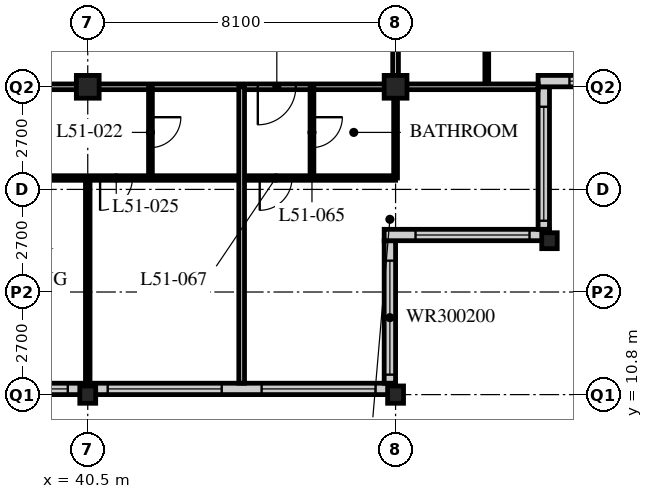
"""IFC4 building model, lengths in metres.
Left out: names, types, materials, properties, quantities, classifications, styles, units other than length and angle.
Written with IfcOpenShell. Run it as: python <this file> out.ifc"""

import sys

from ifc_helpers import new_model, si_unit, direction, frame, frame_2d, origin, origin_2d, place, context, subcontext, project, spatial, rectangle, hollow_rectangle, i_section, extrude, element, fill, save


model = new_model("IFC4")
c1 = context("Model", 3, precision=1e-05, world=origin(), true_north=direction((0.0, 1.0)))
c2 = subcontext(c1, "Body", "Model", "MODEL_VIEW")
j1 = project(units=[si_unit("LENGTHUNIT", "METRE"), si_unit("PLANEANGLEUNIT", "RADIAN")], contexts=[c1])
p1 = place(None, origin())
s1 = spatial("IfcSite", under=j1, at=p1, CompositionType="ELEMENT")
p2 = place(p1, origin())
s2 = spatial("IfcBuilding", under=s1, at=p2, CompositionType="ELEMENT")
p3 = place(p2, frame((0.0, 0.0, 199.2)))
s3 = spatial("IfcBuildingStorey", under=s2, at=p3, CompositionType="ELEMENT", Elevation=199.2)
p4 = place(p3, frame((40.5, 10.8, 0.0), z_axis=(0.0, 0.0, 1.0), x_axis=(1.0, 0.0, 0.0)))
e1 = element("IfcColumn", 1, at=p4, inside=s3, PredefinedType="COLUMN", context=c2, shape_type="SweptSolid", body=[
    extrude(i_section(OverallWidth=0.418, OverallDepth=0.456, WebThickness=0.042, FlangeThickness=0.067, FilletRadius=0.015, at=origin_2d()), origin(), (0.0, 0.0, 1.0), 3.6),
])
p5 = place(p3, frame((40.5, 18.9, 0.0), z_axis=(0.0, 0.0, 1.0), x_axis=(1.0, 0.0, 0.0)))
e2 = element("IfcColumn", 2, at=p5, inside=s3, PredefinedType="COLUMN", context=c2, shape_type="SweptSolid", body=[
    extrude(hollow_rectangle(XDim=0.6, YDim=0.6, WallThickness=0.05, at=origin_2d()), origin(), (0.0, 0.0, 1.0), 3.6),
])
p6 = place(p3, frame((48.6, 10.8, 0.0), z_axis=(0.0, 0.0, 1.0), x_axis=(1.0, 0.0, 0.0)))
e3 = element("IfcColumn", 3, at=p6, inside=s3, PredefinedType="COLUMN", context=c2, shape_type="SweptSolid", body=[
    extrude(i_section(OverallWidth=0.418, OverallDepth=0.456, WebThickness=0.042, FlangeThickness=0.067, FilletRadius=0.015, at=origin_2d()), origin(), (0.0, 0.0, 1.0), 3.6),
])
p7 = place(p3, frame((48.6, 18.9, 0.0), z_axis=(0.0, 0.0, 1.0), x_axis=(1.0, 0.0, 0.0)))
e4 = element("IfcColumn", 4, at=p7, inside=s3, PredefinedType="COLUMN", context=c2, shape_type="SweptSolid", body=[
    extrude(hollow_rectangle(XDim=0.6, YDim=0.6, WallThickness=0.05, at=origin_2d()), origin(), (0.0, 0.0, 1.0), 3.6),
])
p8 = place(p3, frame((52.65, 14.85, 0.0), z_axis=(0.0, 0.0, 1.0), x_axis=(1.0, 0.0, 0.0)))
e5 = element("IfcColumn", 5, at=p8, inside=s3, PredefinedType="COLUMN", context=c2, shape_type="SweptSolid", body=[
    extrude(i_section(OverallWidth=0.407, OverallDepth=0.419, WebThickness=0.031, FlangeThickness=0.049, FilletRadius=0.015, at=origin_2d()), origin(), (0.0, 0.0, 1.0), 3.6),
])
p9 = place(p3, frame((8.4, 10.95, 0.0), z_axis=(0.0, 0.0, 1.0), x_axis=(1.0, 0.0, 0.0)))
e6 = element("IfcWall", 6, at=p9, inside=s3, PredefinedType="SOLIDWALL", context=c2, shape_type="SweptSolid", body=[
    extrude(rectangle(XDim=40.2, YDim=0.3, at=frame_2d((20.1, 0.0))), origin(), (0.0, 0.0, 1.0), 3.39),
])
p10 = place(p9, frame((0.225, 0.0, 0.6)))
e7 = element("IfcOpeningElement", 7, at=p10, cuts=e6, PredefinedType="OPENING", context=c2, shape_type="SweptSolid", body=[
    extrude(rectangle(XDim=3.0, YDim=2.4, at=frame_2d((1.5, 1.2))), frame((0.0, 0.16, 0.0), z_axis=(0.0, -1.0, 0.0), x_axis=(1.0, 0.0, 0.0)), (0.0, 0.0, 1.0), 0.32),
])
p11 = place(p9, frame((4.275, 0.0, 0.6)))
e8 = element("IfcOpeningElement", 8, at=p11, cuts=e6, PredefinedType="OPENING", context=c2, shape_type="SweptSolid", body=[
    extrude(rectangle(XDim=3.0, YDim=2.4, at=frame_2d((1.5, 1.2))), frame((0.0, 0.16, 0.0), z_axis=(0.0, -1.0, 0.0), x_axis=(1.0, 0.0, 0.0)), (0.0, 0.0, 1.0), 0.32),
])
p12 = place(p9, frame((8.325, 0.0, 0.6)))
e9 = element("IfcOpeningElement", 9, at=p12, cuts=e6, PredefinedType="OPENING", context=c2, shape_type="SweptSolid", body=[
    extrude(rectangle(XDim=3.0, YDim=2.4, at=frame_2d((1.5, 1.2))), frame((0.0, 0.16, 0.0), z_axis=(0.0, -1.0, 0.0), x_axis=(1.0, 0.0, 0.0)), (0.0, 0.0, 1.0), 0.32),
])
p13 = place(p9, frame((12.375, 0.0, 0.6)))
e10 = element("IfcOpeningElement", 10, at=p13, cuts=e6, PredefinedType="OPENING", context=c2, shape_type="SweptSolid", body=[
    extrude(rectangle(XDim=3.0, YDim=2.4, at=frame_2d((1.5, 1.2))), frame((0.0, 0.16, 0.0), z_axis=(0.0, -1.0, 0.0), x_axis=(1.0, 0.0, 0.0)), (0.0, 0.0, 1.0), 0.32),
])
p14 = place(p9, frame((16.425, 0.0, 0.6)))
e11 = element("IfcOpeningElement", 11, at=p14, cuts=e6, PredefinedType="OPENING", context=c2, shape_type="SweptSolid", body=[
    extrude(rectangle(XDim=3.0, YDim=2.4, at=frame_2d((1.5, 1.2))), frame((0.0, 0.16, 0.0), z_axis=(0.0, -1.0, 0.0), x_axis=(1.0, 0.0, 0.0)), (0.0, 0.0, 1.0), 0.32),
])
p15 = place(p9, frame((20.475, 0.0, 0.6)))
e12 = element("IfcOpeningElement", 12, at=p15, cuts=e6, PredefinedType="OPENING", context=c2, shape_type="SweptSolid", body=[
    extrude(rectangle(XDim=3.0, YDim=2.4, at=frame_2d((1.5, 1.2))), frame((0.0, 0.16, 0.0), z_axis=(0.0, -1.0, 0.0), x_axis=(1.0, 0.0, 0.0)), (0.0, 0.0, 1.0), 0.32),
])
p16 = place(p9, frame((24.525, 0.0, 0.6)))
e13 = element("IfcOpeningElement", 13, at=p16, cuts=e6, PredefinedType="OPENING", context=c2, shape_type="SweptSolid", body=[
    extrude(rectangle(XDim=3.0, YDim=2.4, at=frame_2d((1.5, 1.2))), frame((0.0, 0.16, 0.0), z_axis=(0.0, -1.0, 0.0), x_axis=(1.0, 0.0, 0.0)), (0.0, 0.0, 1.0), 0.32),
])
p17 = place(p9, frame((28.575, 0.0, 0.6)))
e14 = element("IfcOpeningElement", 14, at=p17, cuts=e6, PredefinedType="OPENING", context=c2, shape_type="SweptSolid", body=[
    extrude(rectangle(XDim=3.0, YDim=2.4, at=frame_2d((1.5, 1.2))), frame((0.0, 0.16, 0.0), z_axis=(0.0, -1.0, 0.0), x_axis=(1.0, 0.0, 0.0)), (0.0, 0.0, 1.0), 0.32),
])
p18 = place(p9, frame((32.625, 0.0, 0.6)))
e15 = element("IfcOpeningElement", 15, at=p18, cuts=e6, PredefinedType="OPENING", context=c2, shape_type="SweptSolid", body=[
    extrude(rectangle(XDim=3.0, YDim=2.4, at=frame_2d((1.5, 1.2))), frame((0.0, 0.16, 0.0), z_axis=(0.0, -1.0, 0.0), x_axis=(1.0, 0.0, 0.0)), (0.0, 0.0, 1.0), 0.32),
])
p19 = place(p9, frame((36.675, 0.0, 0.6)))
e16 = element("IfcOpeningElement", 16, at=p19, cuts=e6, PredefinedType="OPENING", context=c2, shape_type="SweptSolid", body=[
    extrude(rectangle(XDim=3.0, YDim=2.4, at=frame_2d((1.5, 1.2))), frame((0.0, 0.16, 0.0), z_axis=(0.0, -1.0, 0.0), x_axis=(1.0, 0.0, 0.0)), (0.0, 0.0, 1.0), 0.32),
])
p20 = place(p3, frame((48.45, 11.1, 0.0), z_axis=(0.0, 0.0, 1.0), x_axis=(0.0, 1.0, 0.0)))
e17 = element("IfcWall", 17, at=p20, inside=s3, PredefinedType="SOLIDWALL", context=c2, shape_type="SweptSolid", body=[
    extrude(rectangle(XDim=3.75, YDim=0.3, at=frame_2d((1.875, 0.0))), origin(), (0.0, 0.0, 1.0), 3.39),
])
p21 = place(p20, frame((0.225, 0.0, 0.6)))
e18 = element("IfcOpeningElement", 18, at=p21, cuts=e17, PredefinedType="OPENING", context=c2, shape_type="SweptSolid", body=[
    extrude(rectangle(XDim=3.0, YDim=2.0, at=frame_2d((1.5, 1.0))), frame((0.0, 0.16, 0.0), z_axis=(0.0, -1.0, 0.0), x_axis=(1.0, 0.0, 0.0)), (0.0, 0.0, 1.0), 0.32),
])
p22 = place(p3, frame((48.3, 15.0, 0.0), z_axis=(0.0, 0.0, 1.0), x_axis=(1.0, 0.0, 0.0)))
e19 = element("IfcWall", 19, at=p22, inside=s3, PredefinedType="SOLIDWALL", context=c2, shape_type="SweptSolid", body=[
    extrude(rectangle(XDim=4.35, YDim=0.3, at=frame_2d((2.175, 0.0))), origin(), (0.0, 0.0, 1.0), 3.39),
])
p23 = place(p22, frame((0.825, 0.0, 0.6)))
e20 = element("IfcOpeningElement", 20, at=p23, cuts=e19, PredefinedType="OPENING", context=c2, shape_type="SweptSolid", body=[
    extrude(rectangle(XDim=3.0, YDim=2.0, at=frame_2d((1.5, 1.0))), frame((0.0, 0.16, 0.0), z_axis=(0.0, -1.0, 0.0), x_axis=(1.0, 0.0, 0.0)), (0.0, 0.0, 1.0), 0.32),
])
p24 = place(p3, frame((52.5, 15.15, 0.0), z_axis=(0.0, 0.0, 1.0), x_axis=(0.0, 1.0, 0.0)))
e21 = element("IfcWall", 21, at=p24, inside=s3, PredefinedType="SOLIDWALL", context=c2, shape_type="SweptSolid", body=[
    extrude(rectangle(XDim=3.75, YDim=0.3, at=frame_2d((1.875, 0.0))), origin(), (0.0, 0.0, 1.0), 3.39),
])
p25 = place(p24, frame((0.225, 0.0, 0.6)))
e22 = element("IfcOpeningElement", 22, at=p25, cuts=e21, PredefinedType="OPENING", context=c2, shape_type="SweptSolid", body=[
    extrude(rectangle(XDim=3.0, YDim=2.0, at=frame_2d((1.5, 1.0))), frame((0.0, 0.16, 0.0), z_axis=(0.0, -1.0, 0.0), x_axis=(1.0, 0.0, 0.0)), (0.0, 0.0, 1.0), 0.32),
])
p26 = place(p3, frame((52.35, 19.05, 0.0), z_axis=(0.0, 0.0, 1.0), x_axis=(1.0, 0.0, 0.0)))
e23 = element("IfcWall", 23, at=p26, inside=s3, PredefinedType="SOLIDWALL", context=c2, shape_type="SweptSolid", body=[
    extrude(rectangle(XDim=4.35, YDim=0.3, at=frame_2d((2.175, 0.0))), origin(), (0.0, 0.0, 1.0), 3.39),
])
p27 = place(p26, frame((0.825, 0.0, 0.6)))
e24 = element("IfcOpeningElement", 24, at=p27, cuts=e23, PredefinedType="OPENING", context=c2, shape_type="SweptSolid", body=[
    extrude(rectangle(XDim=3.0, YDim=2.0, at=frame_2d((1.5, 1.0))), frame((0.0, 0.16, 0.0), z_axis=(0.0, -1.0, 0.0), x_axis=(1.0, 0.0, 0.0)), (0.0, 0.0, 1.0), 0.32),
])
p28 = place(p3, frame((8.1, 18.9, 0.0), z_axis=(0.0, 0.0, 1.0), x_axis=(1.0, 0.0, 0.0)))
e25 = element("IfcWall", 25, at=p28, inside=s3, PredefinedType="PARTITIONING", context=c2, shape_type="SweptSolid", body=[
    extrude(rectangle(XDim=40.5, YDim=0.15, at=frame_2d((20.25, 0.0))), origin(), (0.0, 0.0, 1.0), 2.778),
])
p29 = place(p28, frame((4.45, 0.0, 0.0)))
e26 = element("IfcOpeningElement", 26, at=p29, cuts=e25, PredefinedType="OPENING", context=c2, shape_type="SweptSolid", body=[
    extrude(rectangle(XDim=1.0, YDim=2.1, at=frame_2d((0.5, 1.05))), frame((0.0, 0.085, 0.0), z_axis=(0.0, -1.0, 0.0), x_axis=(1.0, 0.0, 0.0)), (0.0, 0.0, 1.0), 0.17),
])
p30 = place(p28, frame((17.1, 0.0, 0.0)))
e27 = element("IfcOpeningElement", 27, at=p30, cuts=e25, PredefinedType="OPENING", context=c2, shape_type="SweptSolid", body=[
    extrude(rectangle(XDim=1.0, YDim=2.1, at=frame_2d((0.5, 1.05))), frame((0.0, 0.085, 0.0), z_axis=(0.0, -1.0, 0.0), x_axis=(1.0, 0.0, 0.0)), (0.0, 0.0, 1.0), 0.17),
])
p31 = place(p28, frame((28.75, 0.0, 0.0)))
e28 = element("IfcOpeningElement", 28, at=p31, cuts=e25, PredefinedType="OPENING", context=c2, shape_type="SweptSolid", body=[
    extrude(rectangle(XDim=1.0, YDim=2.1, at=frame_2d((0.5, 1.05))), frame((0.0, 0.085, 0.0), z_axis=(0.0, -1.0, 0.0), x_axis=(1.0, 0.0, 0.0)), (0.0, 0.0, 1.0), 0.17),
])
p32 = place(p28, frame((2.625, 0.0, 0.0)))
e29 = element("IfcOpeningElement", 29, at=p32, cuts=e25, PredefinedType="OPENING", context=c2, shape_type="SweptSolid", body=[
    extrude(rectangle(XDim=1.0, YDim=2.1, at=frame_2d((0.5, 1.05))), frame((0.0, 0.085, 0.0), z_axis=(0.0, -1.0, 0.0), x_axis=(1.0, 0.0, 0.0)), (0.0, 0.0, 1.0), 0.17),
])
p33 = place(p28, frame((36.875, 0.0, 0.0)))
e30 = element("IfcOpeningElement", 30, at=p33, cuts=e25, PredefinedType="OPENING", context=c2, shape_type="SweptSolid", body=[
    extrude(rectangle(XDim=1.0, YDim=2.1, at=frame_2d((0.5, 1.05))), frame((0.0, 0.085, 0.0), z_axis=(0.0, -1.0, 0.0), x_axis=(1.0, 0.0, 0.0)), (0.0, 0.0, 1.0), 0.17),
])
p34 = place(p3, frame((48.6, 18.9, 0.0), z_axis=(0.0, 0.0, 1.0), x_axis=(0.0, 1.0, 0.0)))
e31 = element("IfcWall", 31, at=p34, inside=s3, PredefinedType="PARTITIONING", context=c2, shape_type="SweptSolid", body=[
    extrude(rectangle(XDim=24.3, YDim=0.15, at=frame_2d((12.15, 0.0))), origin(), (0.0, 0.0, 1.0), 2.778),
])
p35 = place(p34, frame((2.35, 0.0, 0.0)))
e32 = element("IfcOpeningElement", 32, at=p35, cuts=e31, PredefinedType="OPENING", context=c2, shape_type="SweptSolid", body=[
    extrude(rectangle(XDim=1.0, YDim=2.1, at=frame_2d((0.5, 1.05))), frame((0.0, 0.085, 0.0), z_axis=(0.0, -1.0, 0.0), x_axis=(1.0, 0.0, 0.0)), (0.0, 0.0, 1.0), 0.17),
])
p36 = place(p34, frame((4.75, 0.0, 0.0)))
e33 = element("IfcOpeningElement", 33, at=p36, cuts=e31, PredefinedType="OPENING", context=c2, shape_type="SweptSolid", body=[
    extrude(rectangle(XDim=1.0, YDim=2.1, at=frame_2d((0.5, 1.05))), frame((0.0, 0.085, 0.0), z_axis=(0.0, -1.0, 0.0), x_axis=(1.0, 0.0, 0.0)), (0.0, 0.0, 1.0), 0.17),
])
p37 = place(p34, frame((9.0, 0.0, 0.0)))
e34 = element("IfcOpeningElement", 34, at=p37, cuts=e31, PredefinedType="OPENING", context=c2, shape_type="SweptSolid", body=[
    extrude(rectangle(XDim=1.0, YDim=2.1, at=frame_2d((0.5, 1.05))), frame((0.0, 0.085, 0.0), z_axis=(0.0, -1.0, 0.0), x_axis=(1.0, 0.0, 0.0)), (0.0, 0.0, 1.0), 0.17),
])
p38 = place(p3, frame((42.15, 18.9, 0.0), z_axis=(0.0, 0.0, 1.0), x_axis=(0.0, -1.0, 0.0)))
e35 = element("IfcWall", 35, at=p38, inside=s3, PredefinedType="PARTITIONING", context=c2, shape_type="SweptSolid", body=[
    extrude(rectangle(XDim=2.4, YDim=0.1, at=frame_2d((1.2, 0.0))), origin(), (0.0, 0.0, 1.0), 3.39),
])
p39 = place(p38, frame((0.8, 0.0, 0.0)))
e36 = element("IfcOpeningElement", 36, at=p39, cuts=e35, PredefinedType="OPENING", context=c2, shape_type="SweptSolid", body=[
    extrude(rectangle(XDim=0.8, YDim=2.1, at=frame_2d((0.4, 1.05))), frame((0.0, 0.06, 0.0), z_axis=(0.0, -1.0, 0.0), x_axis=(1.0, 0.0, 0.0)), (0.0, 0.0, 1.0), 0.12),
])
p40 = place(p3, frame((40.5, 16.5, 0.0), z_axis=(0.0, 0.0, 1.0), x_axis=(0.0, -1.0, 0.0)))
e37 = element("IfcWall", 37, at=p40, inside=s3, PredefinedType="PARTITIONING", context=c2, shape_type="SweptSolid", body=[
    extrude(rectangle(XDim=5.4, YDim=0.12, at=frame_2d((2.7, 0.0))), origin(), (0.0, 0.0, 1.0), 2.778),
])
p41 = place(p3, frame((51.0, 18.9, 0.0), z_axis=(0.0, 0.0, 1.0), x_axis=(0.0, 1.0, 0.0)))
e38 = element("IfcWall", 38, at=p41, inside=s3, PredefinedType="PARTITIONING", context=c2, shape_type="SweptSolid", body=[
    extrude(rectangle(XDim=2.2, YDim=0.1, at=frame_2d((1.1, 0.0))), origin(), (0.0, 0.0, 1.0), 3.39),
])
p42 = place(p3, frame((8.1, 16.5, 0.0), z_axis=(0.0, 0.0, 1.0), x_axis=(1.0, 0.0, 0.0)))
e39 = element("IfcWall", 39, at=p42, inside=s3, PredefinedType="PARTITIONING", context=c2, shape_type="SweptSolid", body=[
    extrude(rectangle(XDim=40.5, YDim=0.12, at=frame_2d((20.25, 0.0))), origin(), (0.0, 0.0, 1.0), 3.39),
])
p43 = place(p42, frame((5.025, 0.0, 0.0)))
e40 = element("IfcOpeningElement", 40, at=p43, cuts=e39, PredefinedType="OPENING", context=c2, shape_type="SweptSolid", body=[
    extrude(rectangle(XDim=0.85, YDim=2.1, at=frame_2d((0.425, 1.05))), frame((0.0, 0.07, 0.0), z_axis=(0.0, -1.0, 0.0), x_axis=(1.0, 0.0, 0.0)), (0.0, 0.0, 1.0), 0.14),
])
p44 = place(p42, frame((12.475, 0.0, 0.0)))
e41 = element("IfcOpeningElement", 41, at=p44, cuts=e39, PredefinedType="OPENING", context=c2, shape_type="SweptSolid", body=[
    extrude(rectangle(XDim=0.85, YDim=2.1, at=frame_2d((0.425, 1.05))), frame((0.0, 0.07, 0.0), z_axis=(0.0, -1.0, 0.0), x_axis=(1.0, 0.0, 0.0)), (0.0, 0.0, 1.0), 0.14),
])
p45 = place(p42, frame((17.175, 0.0, 0.0)))
e42 = element("IfcOpeningElement", 42, at=p45, cuts=e39, PredefinedType="OPENING", context=c2, shape_type="SweptSolid", body=[
    extrude(rectangle(XDim=0.85, YDim=2.1, at=frame_2d((0.425, 1.05))), frame((0.0, 0.07, 0.0), z_axis=(0.0, -1.0, 0.0), x_axis=(1.0, 0.0, 0.0)), (0.0, 0.0, 1.0), 0.14),
])
p46 = place(p42, frame((24.625, 0.0, 0.0)))
e43 = element("IfcOpeningElement", 43, at=p46, cuts=e39, PredefinedType="OPENING", context=c2, shape_type="SweptSolid", body=[
    extrude(rectangle(XDim=0.85, YDim=2.1, at=frame_2d((0.425, 1.05))), frame((0.0, 0.07, 0.0), z_axis=(0.0, -1.0, 0.0), x_axis=(1.0, 0.0, 0.0)), (0.0, 0.0, 1.0), 0.14),
])
p47 = place(p42, frame((29.325, 0.0, 0.0)))
e44 = element("IfcOpeningElement", 44, at=p47, cuts=e39, PredefinedType="OPENING", context=c2, shape_type="SweptSolid", body=[
    extrude(rectangle(XDim=0.85, YDim=2.1, at=frame_2d((0.425, 1.05))), frame((0.0, 0.07, 0.0), z_axis=(0.0, -1.0, 0.0), x_axis=(1.0, 0.0, 0.0)), (0.0, 0.0, 1.0), 0.14),
])
p48 = place(p42, frame((32.725, 0.0, 0.0)))
e45 = element("IfcOpeningElement", 45, at=p48, cuts=e39, PredefinedType="OPENING", context=c2, shape_type="SweptSolid", body=[
    extrude(rectangle(XDim=0.85, YDim=2.1, at=frame_2d((0.425, 1.05))), frame((0.0, 0.07, 0.0), z_axis=(0.0, -1.0, 0.0), x_axis=(1.0, 0.0, 0.0)), (0.0, 0.0, 1.0), 0.14),
])
p49 = place(p42, frame((2.725, 0.0, 0.0)))
e46 = element("IfcOpeningElement", 46, at=p49, cuts=e39, PredefinedType="OPENING", context=c2, shape_type="SweptSolid", body=[
    extrude(rectangle(XDim=0.85, YDim=2.1, at=frame_2d((0.425, 1.05))), frame((0.0, 0.07, 0.0), z_axis=(0.0, -1.0, 0.0), x_axis=(1.0, 0.0, 0.0)), (0.0, 0.0, 1.0), 0.14),
])
p50 = place(p42, frame((36.925, 0.0, 0.0)))
e47 = element("IfcOpeningElement", 47, at=p50, cuts=e39, PredefinedType="OPENING", context=c2, shape_type="SweptSolid", body=[
    extrude(rectangle(XDim=0.85, YDim=2.1, at=frame_2d((0.425, 1.05))), frame((0.0, 0.07, 0.0), z_axis=(0.0, -1.0, 0.0), x_axis=(1.0, 0.0, 0.0)), (0.0, 0.0, 1.0), 0.14),
])
p51 = place(p3, frame((46.4, 18.9, 0.0), z_axis=(0.0, 0.0, 1.0), x_axis=(0.0, -1.0, 0.0)))
e48 = element("IfcWall", 48, at=p51, inside=s3, PredefinedType="PARTITIONING", context=c2, shape_type="SweptSolid", body=[
    extrude(rectangle(XDim=2.4, YDim=0.1, at=frame_2d((1.2, 0.0))), origin(), (0.0, 0.0, 1.0), 3.39),
])
p52 = place(p51, frame((0.8, 0.0, 0.0)))
e49 = element("IfcOpeningElement", 49, at=p52, cuts=e48, PredefinedType="OPENING", context=c2, shape_type="SweptSolid", body=[
    extrude(rectangle(XDim=0.8, YDim=2.1, at=frame_2d((0.4, 1.05))), frame((0.0, 0.06, 0.0), z_axis=(0.0, -1.0, 0.0), x_axis=(1.0, 0.0, 0.0)), (0.0, 0.0, 1.0), 0.12),
])
p53 = place(p3, frame((48.6, 18.9, 0.0), z_axis=(0.0, 0.0, 1.0), x_axis=(0.0, -1.0, 0.0)))
e50 = element("IfcWall", 50, at=p53, inside=s3, PredefinedType="PARTITIONING", context=c2, shape_type="SweptSolid", body=[
    extrude(rectangle(XDim=2.4, YDim=0.1, at=frame_2d((1.2, 0.0))), origin(), (0.0, 0.0, 1.0), 2.778),
])
p54 = place(p3, frame((48.6, 18.9, 0.0), z_axis=(0.0, 0.0, 1.0), x_axis=(1.0, 0.0, 0.0)))
e51 = element("IfcWall", 51, at=p54, inside=s3, PredefinedType="PARTITIONING", context=c2, shape_type="SweptSolid", body=[
    extrude(rectangle(XDim=3.75, YDim=0.15, at=frame_2d((1.875, 0.0))), origin(), (0.0, 0.0, 1.0), 2.778),
])
p55 = place(p3, frame((44.55, 18.9, 0.0), z_axis=(0.0, 0.0, 1.0), x_axis=(0.0, -1.0, 0.0)))
e52 = element("IfcWall", 52, at=p55, inside=s3, PredefinedType="PARTITIONING", context=c2, shape_type="SweptSolid", body=[
    extrude(rectangle(XDim=7.8, YDim=0.15, at=frame_2d((3.9, 0.0))), origin(), (0.0, 0.0, 1.0), 3.39),
])
p56 = place(p17, origin())
e53 = element("IfcWindow", 53, at=p56, inside=s3, PartitioningType="SINGLE_PANEL", PredefinedType="WINDOW", context=c2, shape_type="SweptSolid", body=[
    extrude(rectangle(XDim=3.0, YDim=2.4, at=frame_2d((1.5, 1.2))), frame((0.0, 0.03, 0.0), z_axis=(0.0, -1.0, 0.0), x_axis=(1.0, 0.0, 0.0)), (0.0, 0.0, 1.0), 0.06),
])
fill(e14, e53)
p57 = place(p18, origin())
e54 = element("IfcWindow", 54, at=p57, inside=s3, PartitioningType="SINGLE_PANEL", PredefinedType="WINDOW", context=c2, shape_type="SweptSolid", body=[
    extrude(rectangle(XDim=3.0, YDim=2.4, at=frame_2d((1.5, 1.2))), frame((0.0, 0.03, 0.0), z_axis=(0.0, -1.0, 0.0), x_axis=(1.0, 0.0, 0.0)), (0.0, 0.0, 1.0), 0.06),
])
fill(e15, e54)
p58 = place(p19, origin())
e55 = element("IfcWindow", 55, at=p58, inside=s3, PartitioningType="SINGLE_PANEL", PredefinedType="WINDOW", context=c2, shape_type="SweptSolid", body=[
    extrude(rectangle(XDim=3.0, YDim=2.4, at=frame_2d((1.5, 1.2))), frame((0.0, 0.03, 0.0), z_axis=(0.0, -1.0, 0.0), x_axis=(1.0, 0.0, 0.0)), (0.0, 0.0, 1.0), 0.06),
])
fill(e16, e55)
p59 = place(p21, origin())
e56 = element("IfcWindow", 56, at=p59, inside=s3, PartitioningType="SINGLE_PANEL", PredefinedType="WINDOW", context=c2, shape_type="SweptSolid", body=[
    extrude(rectangle(XDim=3.0, YDim=2.0, at=frame_2d((1.5, 1.0))), frame((0.0, 0.03, 0.0), z_axis=(0.0, -1.0, 0.0), x_axis=(1.0, 0.0, 0.0)), (0.0, 0.0, 1.0), 0.06),
])
fill(e18, e56)
p60 = place(p23, origin())
e57 = element("IfcWindow", 57, at=p60, inside=s3, PartitioningType="SINGLE_PANEL", PredefinedType="WINDOW", context=c2, shape_type="SweptSolid", body=[
    extrude(rectangle(XDim=3.0, YDim=2.0, at=frame_2d((1.5, 1.0))), frame((0.0, 0.03, 0.0), z_axis=(0.0, -1.0, 0.0), x_axis=(1.0, 0.0, 0.0)), (0.0, 0.0, 1.0), 0.06),
])
fill(e20, e57)
p61 = place(p25, origin())
e58 = element("IfcWindow", 58, at=p61, inside=s3, PartitioningType="SINGLE_PANEL", PredefinedType="WINDOW", context=c2, shape_type="SweptSolid", body=[
    extrude(rectangle(XDim=3.0, YDim=2.0, at=frame_2d((1.5, 1.0))), frame((0.0, 0.03, 0.0), z_axis=(0.0, -1.0, 0.0), x_axis=(1.0, 0.0, 0.0)), (0.0, 0.0, 1.0), 0.06),
])
fill(e22, e58)
p62 = place(p27, origin())
e59 = element("IfcWindow", 59, at=p62, inside=s3, PartitioningType="SINGLE_PANEL", PredefinedType="WINDOW", context=c2, shape_type="SweptSolid", body=[
    extrude(rectangle(XDim=3.0, YDim=2.0, at=frame_2d((1.5, 1.0))), frame((0.0, 0.03, 0.0), z_axis=(0.0, -1.0, 0.0), x_axis=(1.0, 0.0, 0.0)), (0.0, 0.0, 1.0), 0.06),
])
fill(e24, e59)
p63 = place(p39, origin())
e60 = element("IfcDoor", 60, at=p63, inside=s3, OperationType="SINGLE_SWING_LEFT", PredefinedType="DOOR", context=c2, shape_type="SweptSolid", body=[
    extrude(rectangle(XDim=0.8, YDim=2.1, at=frame_2d((0.4, 1.05))), frame((0.0, 0.025, 0.0), z_axis=(0.0, -1.0, 0.0), x_axis=(1.0, 0.0, 0.0)), (0.0, 0.0, 1.0), 0.05),
])
fill(e36, e60)
p64 = place(p48, origin())
e61 = element("IfcDoor", 61, at=p64, inside=s3, OperationType="SINGLE_SWING_RIGHT", PredefinedType="DOOR", context=c2, shape_type="SweptSolid", body=[
    extrude(rectangle(XDim=0.85, YDim=2.1, at=frame_2d((0.425, 1.05))), frame((0.0, 0.025, 0.0), z_axis=(0.0, -1.0, 0.0), x_axis=(1.0, 0.0, 0.0)), (0.0, 0.0, 1.0), 0.05),
])
fill(e45, e61)
p65 = place(p52, origin())
e62 = element("IfcDoor", 62, at=p65, inside=s3, OperationType="SINGLE_SWING_LEFT", PredefinedType="DOOR", context=c2, shape_type="SweptSolid", body=[
    extrude(rectangle(XDim=0.8, YDim=2.1, at=frame_2d((0.4, 1.05))), frame((0.0, 0.025, 0.0), z_axis=(0.0, -1.0, 0.0), x_axis=(1.0, 0.0, 0.0)), (0.0, 0.0, 1.0), 0.05),
])
fill(e49, e62)
p66 = place(p33, origin())
e63 = element("IfcDoor", 63, at=p66, inside=s3, OperationType="SINGLE_SWING_RIGHT", PredefinedType="DOOR", context=c2, shape_type="SweptSolid", body=[
    extrude(rectangle(XDim=1.0, YDim=2.1, at=frame_2d((0.5, 1.05))), frame((0.0, 0.025, 0.0), z_axis=(0.0, -1.0, 0.0), x_axis=(1.0, 0.0, 0.0)), (0.0, 0.0, 1.0), 0.05),
])
fill(e30, e63)
p67 = place(p50, origin())
e64 = element("IfcDoor", 64, at=p67, inside=s3, OperationType="SINGLE_SWING_RIGHT", PredefinedType="DOOR", context=c2, shape_type="SweptSolid", body=[
    extrude(rectangle(XDim=0.85, YDim=2.1, at=frame_2d((0.425, 1.05))), frame((0.0, 0.025, 0.0), z_axis=(0.0, -1.0, 0.0), x_axis=(1.0, 0.0, 0.0)), (0.0, 0.0, 1.0), 0.05),
])
fill(e47, e64)
save(model, sys.argv[1])
